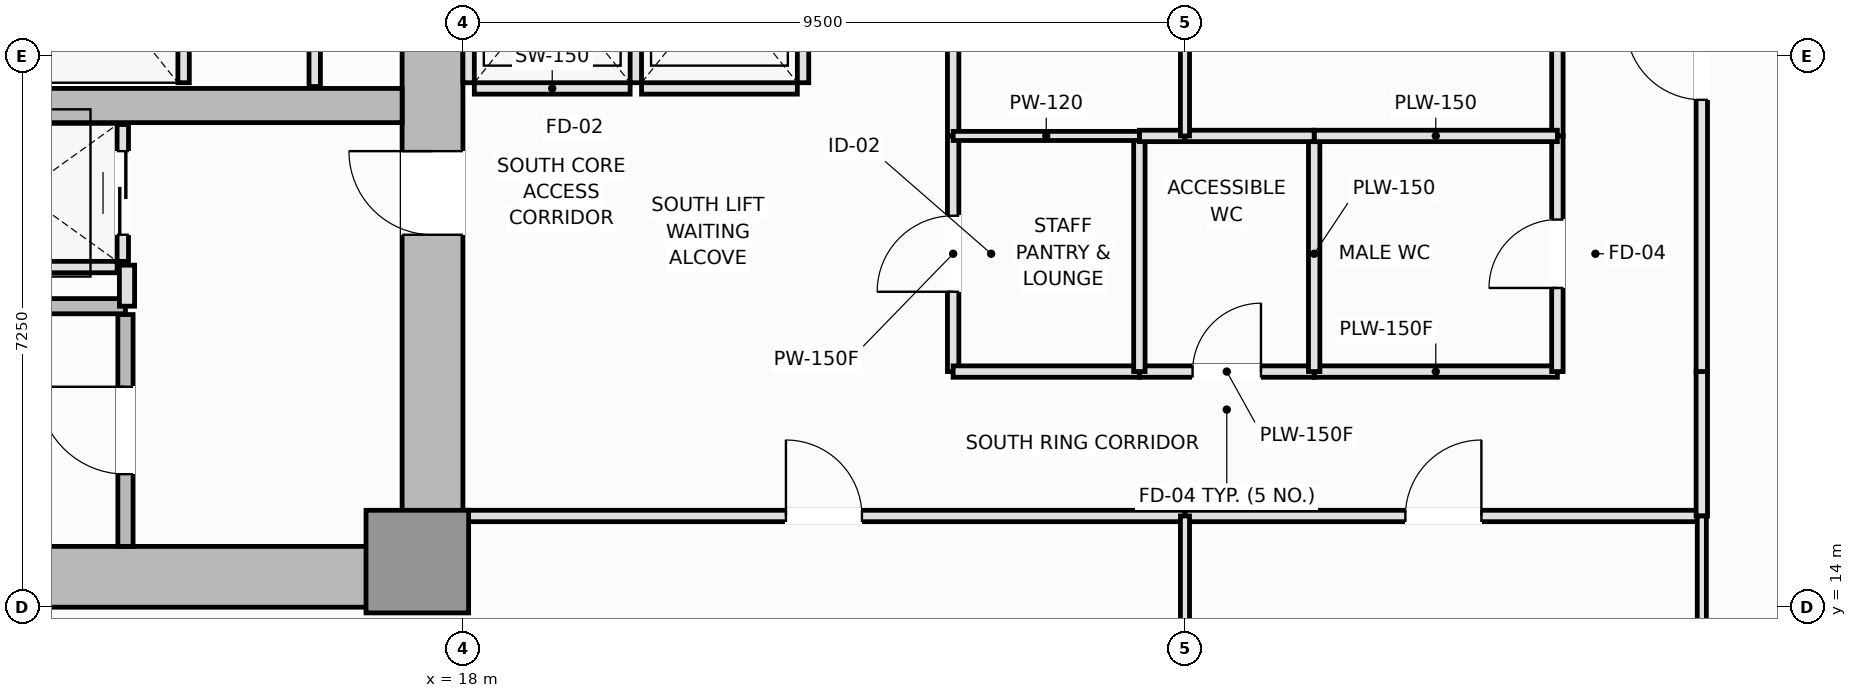
"""IFC4 building model, lengths in metres.
Left out: names, types, materials, properties, quantities, classifications, styles, units other than length and angle.
Written with IfcOpenShell. Run it as: python <this file> out.ifc"""

import sys

from ifc_helpers import new_model, si_unit, direction, frame, frame_2d, origin, origin_2d, place, context, subcontext, project, spatial, rectangle, extrude, element, fill, save


model = new_model("IFC4")
c1 = context("Model", 3, precision=1e-05, world=origin(), true_north=direction((0.0, 1.0)))
c2 = subcontext(c1, "Body", "Model", "MODEL_VIEW")
j1 = project(units=[si_unit("LENGTHUNIT", "METRE"), si_unit("PLANEANGLEUNIT", "RADIAN")], contexts=[c1])
p1 = place(None, origin())
s1 = spatial("IfcSite", under=j1, at=p1, CompositionType="ELEMENT")
p2 = place(p1, origin())
s2 = spatial("IfcBuilding", under=s1, at=p2, CompositionType="ELEMENT")
p3 = place(p2, frame((0.0, 0.0, 36.25)))
s3 = spatial("IfcBuildingStorey", under=s2, at=p3, CompositionType="ELEMENT", Elevation=36.25)
p4 = place(p3, frame((4.5, 14.4, 0.0), z_axis=(0.0, 0.0, 1.0), x_axis=(1.0, 0.0, 0.0)))
e1 = element("IfcWall", 1, at=p4, inside=s3, PredefinedType="SHEAR", context=c2, shape_type="SweptSolid", body=[
    extrude(rectangle(XDim=13.5, YDim=0.8, at=frame_2d((6.75, 0.0))), origin(), (0.0, 0.0, 1.0), 3.55),
])
p5 = place(p3, frame((17.6, 14.8, 0.0), z_axis=(0.0, 0.0, 1.0), x_axis=(0.0, 1.0, 0.0)))
e2 = element("IfcWall", 2, at=p5, inside=s3, PredefinedType="SHEAR", context=c2, shape_type="SweptSolid", body=[
    extrude(rectangle(XDim=8.65, YDim=0.8, at=frame_2d((4.325, 0.0))), origin(), (0.0, 0.0, 1.0), 3.55),
])
p6 = place(p5, frame((4.1, 0.0, 0.0)))
e3 = element("IfcOpeningElement", 3, at=p6, cuts=e2, PredefinedType="OPENING", context=c2, shape_type="SweptSolid", body=[
    extrude(rectangle(XDim=1.1, YDim=2.15, at=frame_2d((0.55, 1.075))), frame((0.0, 0.41, 0.0), z_axis=(0.0, -1.0, 0.0), x_axis=(1.0, 0.0, 0.0)), (0.0, 0.0, 1.0), 0.82),
])
p7 = place(p3, frame((5.3, 20.6, 0.0), z_axis=(0.0, 0.0, 1.0), x_axis=(1.0, 0.0, 0.0)))
e4 = element("IfcWall", 4, at=p7, inside=s3, PredefinedType="SHEAR", context=c2, shape_type="SweptSolid", body=[
    extrude(rectangle(XDim=11.9, YDim=0.45, at=frame_2d((5.95, 0.0))), origin(), (0.0, 0.0, 1.0), 3.55),
])
p8 = place(p3, frame((17.4, 14.6, 0.0), z_axis=(0.0, 0.0, 1.0), x_axis=(1.0, 0.0, 0.0)))
e5 = element("IfcColumn", 5, at=p8, inside=s3, PredefinedType="PILASTER", context=c2, shape_type="SweptSolid", body=[
    extrude(rectangle(XDim=1.35, YDim=1.35, at=origin_2d()), origin(), (0.0, 0.0, 1.0), 3.55),
])
p9 = place(p3, frame((5.9, 17.96, 0.0), z_axis=(0.0, 0.0, 1.0), x_axis=(1.0, 0.0, 0.0)))
e6 = element("IfcWall", 6, at=p9, inside=s3, PredefinedType="SOLIDWALL", context=c2, shape_type="SweptSolid", body=[
    extrude(rectangle(XDim=7.66, YDim=0.2, at=frame_2d((3.83, 0.0))), origin(), (0.0, 0.0, 1.0), 3.55),
])
p10 = place(p3, frame((13.56, 14.8, 0.0), z_axis=(0.0, 0.0, 1.0), x_axis=(0.0, 1.0, 0.0)))
e7 = element("IfcWall", 7, at=p10, inside=s3, PredefinedType="SOLIDWALL", context=c2, shape_type="SweptSolid", body=[
    extrude(rectangle(XDim=3.05, YDim=0.2, at=frame_2d((1.525, 0.0))), origin(), (0.0, 0.0, 1.0), 3.55),
])
p11 = place(p10, frame((0.95, 0.0, 0.0)))
e8 = element("IfcOpeningElement", 8, at=p11, cuts=e7, PredefinedType="OPENING", context=c2, shape_type="SweptSolid", body=[
    extrude(rectangle(XDim=1.15, YDim=2.15, at=frame_2d((0.575, 1.075))), frame((0.0, 0.11, 0.0), z_axis=(0.0, -1.0, 0.0), x_axis=(1.0, 0.0, 0.0)), (0.0, 0.0, 1.0), 0.22),
])
p12 = place(p3, frame((18.15, 20.825, 0.0), z_axis=(0.0, 0.0, 1.0), x_axis=(1.0, 0.0, 0.0)))
e9 = element("IfcWall", 9, at=p12, inside=s3, PredefinedType="PARTITIONING", context=c2, shape_type="SweptSolid", body=[
    extrude(rectangle(XDim=2.05, YDim=0.15, at=frame_2d((1.025, 0.0))), origin(), (0.0, 0.0, 1.0), 3.37),
])
for number, where, z_axis, x_axis in (
    (10, (18.075, 20.9, 0.0), (0.0, 0.0, 1.0), (0.0, 1.0, 0.0)),
    (11, (20.275, 20.9, 0.0), (0.0, 0.0, 1.0), (0.0, 1.0, 0.0)),
):
    element("IfcWall", number, at=place(p3, frame(where, z_axis=z_axis, x_axis=x_axis)), inside=s3, PredefinedType="PARTITIONING", context=c2, shape_type="SweptSolid", body=[
        extrude(rectangle(XDim=2.55, YDim=0.15, at=frame_2d((1.275, 0.0))), origin(), (0.0, 0.0, 1.0), 3.37),
    ])
p13 = place(p3, frame((20.35, 20.825, 0.0), z_axis=(0.0, 0.0, 1.0), x_axis=(1.0, 0.0, 0.0)))
e12 = element("IfcWall", 12, at=p13, inside=s3, PredefinedType="PARTITIONING", context=c2, shape_type="SweptSolid", body=[
    extrude(rectangle(XDim=2.05, YDim=0.15, at=frame_2d((1.025, 0.0))), origin(), (0.0, 0.0, 1.0), 3.37),
])
for number, where, z_axis, x_axis in (
    (13, (22.475, 20.9, 0.0), (0.0, 0.0, 1.0), (0.0, 1.0, 0.0)),
    (14, (14.325, 20.9, 0.0), (0.0, 0.0, 1.0), (0.0, 1.0, 0.0)),
):
    element("IfcWall", number, at=place(p3, frame(where, z_axis=z_axis, x_axis=x_axis)), inside=s3, PredefinedType="PARTITIONING", context=c2, shape_type="SweptSolid", body=[
        extrude(rectangle(XDim=2.55, YDim=0.15, at=frame_2d((1.275, 0.0))), origin(), (0.0, 0.0, 1.0), 3.37),
    ])
p14 = place(p3, frame((10.95, 18.475, 0.0), z_axis=(0.0, 0.0, 1.0), x_axis=(1.0, 0.0, 0.0)))
e15 = element("IfcWall", 15, at=p14, inside=s3, PredefinedType="PARTITIONING", context=c2, shape_type="SweptSolid", body=[
    extrude(rectangle(XDim=2.5, YDim=0.15, at=frame_2d((1.25, 0.0))), origin(), (0.0, 0.0, 1.0), 3.37),
])
p15 = place(p3, frame((13.525, 18.55, 0.0), z_axis=(0.0, 0.0, 1.0), x_axis=(0.0, 1.0, 0.0)))
e16 = element("IfcWall", 16, at=p15, inside=s3, PredefinedType="PARTITIONING", context=c2, shape_type="SweptSolid", body=[
    extrude(rectangle(XDim=1.8, YDim=0.15, at=frame_2d((0.9, 0.0))), origin(), (0.0, 0.0, 1.0), 3.37),
])
p16 = place(p15, frame((0.35, 0.0, 0.0)))
e17 = element("IfcOpeningElement", 17, at=p16, cuts=e16, PredefinedType="OPENING", context=c2, shape_type="SweptSolid", body=[
    extrude(rectangle(XDim=1.1, YDim=2.2, at=frame_2d((0.55, 1.1))), frame((0.0, 0.085, 0.0), z_axis=(0.0, -1.0, 0.0), x_axis=(1.0, 0.0, 0.0)), (0.0, 0.0, 1.0), 0.17),
])
p17 = place(p3, frame((13.58, 17.96, 0.0), z_axis=(0.0, 0.0, 1.0), x_axis=(0.0, 1.0, 0.0)))
e18 = element("IfcWall", 18, at=p17, inside=s3, PredefinedType="PARTITIONING", context=c2, shape_type="SweptSolid", body=[
    extrude(rectangle(XDim=0.54, YDim=0.2, at=frame_2d((0.27, 0.0))), origin(), (0.0, 0.0, 1.0), 3.37),
])
p18 = place(p3, frame((16.05, 20.85, 0.0), z_axis=(0.0, 0.0, 1.0), x_axis=(0.0, 1.0, 0.0)))
e19 = element("IfcWall", 19, at=p18, inside=s3, PredefinedType="PARTITIONING", context=c2, shape_type="SweptSolid", body=[
    extrude(rectangle(XDim=2.67, YDim=0.15, at=frame_2d((1.335, 0.0))), origin(), (0.0, 0.0, 1.0), 3.37),
])
p19 = place(p18, frame((0.885, 0.0, 0.0)))
e20 = element("IfcOpeningElement", 20, at=p19, cuts=e19, PredefinedType="OPENING", context=c2, shape_type="SweptSolid", body=[
    extrude(rectangle(XDim=0.9, YDim=2.1, at=frame_2d((0.45, 1.05))), frame((0.0, 0.085, 0.0), z_axis=(0.0, -1.0, 0.0), x_axis=(1.0, 0.0, 0.0)), (0.0, 0.0, 1.0), 0.17),
])
p20 = place(p3, frame((24.45, 17.1, 0.0), z_axis=(0.0, 0.0, 1.0), x_axis=(0.0, 1.0, 0.0)))
e21 = element("IfcWall", 21, at=p20, inside=s3, PredefinedType="PARTITIONING", context=c2, shape_type="SweptSolid", body=[
    extrude(rectangle(XDim=3.1, YDim=0.15, at=frame_2d((1.55, 0.0))), origin(), (0.0, 0.0, 1.0), 3.37),
])
p21 = place(p20, frame((1.05, 0.0, 0.0)))
e22 = element("IfcOpeningElement", 22, at=p21, cuts=e21, PredefinedType="OPENING", context=c2, shape_type="SweptSolid", body=[
    extrude(rectangle(XDim=1.0, YDim=2.15, at=frame_2d((0.5, 1.075))), frame((0.0, 0.085, 0.0), z_axis=(0.0, -1.0, 0.0), x_axis=(1.0, 0.0, 0.0)), (0.0, 0.0, 1.0), 0.17),
])
p22 = place(p3, frame((24.45, 20.2, 0.0), z_axis=(0.0, 0.0, 1.0), x_axis=(0.0, 1.0, 0.0)))
e23 = element("IfcWall", 23, at=p22, inside=s3, PredefinedType="PARTITIONING", context=c2, shape_type="SweptSolid", body=[
    extrude(rectangle(XDim=5.05, YDim=0.15, at=frame_2d((2.525, 0.0))), origin(), (0.0, 0.0, 1.0), 3.37),
])
p23 = place(p22, frame((2.025, 0.0, 0.0)))
e24 = element("IfcOpeningElement", 24, at=p23, cuts=e23, PredefinedType="OPENING", context=c2, shape_type="SweptSolid", body=[
    extrude(rectangle(XDim=1.0, YDim=2.15, at=frame_2d((0.5, 1.075))), frame((0.0, 0.085, 0.0), z_axis=(0.0, -1.0, 0.0), x_axis=(1.0, 0.0, 0.0)), (0.0, 0.0, 1.0), 0.17),
])
p24 = place(p3, frame((29.2, 17.1, 0.0), z_axis=(0.0, 0.0, 1.0), x_axis=(1.0, 0.0, 0.0)))
e25 = element("IfcWall", 25, at=p24, inside=s3, PredefinedType="PLUMBINGWALL", context=c2, shape_type="SweptSolid", body=[
    extrude(rectangle(XDim=3.2, YDim=0.15, at=frame_2d((1.6, 0.0))), origin(), (0.0, 0.0, 1.0), 3.37),
])
p25 = place(p3, frame((26.9, 17.1, 0.0), z_axis=(0.0, 0.0, 1.0), x_axis=(1.0, 0.0, 0.0)))
e26 = element("IfcWall", 26, at=p25, inside=s3, PredefinedType="PLUMBINGWALL", context=c2, shape_type="SweptSolid", body=[
    extrude(rectangle(XDim=2.3, YDim=0.15, at=frame_2d((1.15, 0.0))), origin(), (0.0, 0.0, 1.0), 3.37),
])
p26 = place(p25, frame((0.7, 0.0, 0.0)))
e27 = element("IfcOpeningElement", 27, at=p26, cuts=e26, PredefinedType="OPENING", context=c2, shape_type="SweptSolid", body=[
    extrude(rectangle(XDim=0.9, YDim=2.1, at=frame_2d((0.45, 1.05))), frame((0.0, 0.085, 0.0), z_axis=(0.0, -1.0, 0.0), x_axis=(1.0, 0.0, 0.0)), (0.0, 0.0, 1.0), 0.17),
])
p27 = place(p3, frame((24.45, 17.1, 0.0), z_axis=(0.0, 0.0, 1.0), x_axis=(1.0, 0.0, 0.0)))
e28 = element("IfcWall", 28, at=p27, inside=s3, PredefinedType="PARTITIONING", context=c2, shape_type="SweptSolid", body=[
    extrude(rectangle(XDim=2.45, YDim=0.15, at=frame_2d((1.225, 0.0))), origin(), (0.0, 0.0, 1.0), 3.37),
])
p28 = place(p3, frame((18.0, 15.2, 0.0), z_axis=(0.0, 0.0, 1.0), x_axis=(1.0, 0.0, 0.0)))
e29 = element("IfcWall", 29, at=p28, inside=s3, PredefinedType="PARTITIONING", context=c2, shape_type="SweptSolid", body=[
    extrude(rectangle(XDim=9.5, YDim=0.15, at=frame_2d((4.75, 0.0))), origin(), (0.0, 0.0, 1.0), 3.37),
])
p29 = place(p28, frame((4.25, 0.0, 0.0)))
e30 = element("IfcOpeningElement", 30, at=p29, cuts=e29, PredefinedType="OPENING", context=c2, shape_type="SweptSolid", body=[
    extrude(rectangle(XDim=1.0, YDim=2.15, at=frame_2d((0.5, 1.075))), frame((0.0, 0.085, 0.0), z_axis=(0.0, -1.0, 0.0), x_axis=(1.0, 0.0, 0.0)), (0.0, 0.0, 1.0), 0.17),
])
p30 = place(p3, frame((27.5, 15.2, 0.0), z_axis=(0.0, 0.0, 1.0), x_axis=(1.0, 0.0, 0.0)))
e31 = element("IfcWall", 31, at=p30, inside=s3, PredefinedType="PARTITIONING", context=c2, shape_type="SweptSolid", body=[
    extrude(rectangle(XDim=6.8, YDim=0.15, at=frame_2d((3.4, 0.0))), origin(), (0.0, 0.0, 1.0), 3.37),
])
p31 = place(p30, frame((2.9, 0.0, 0.0)))
e32 = element("IfcOpeningElement", 32, at=p31, cuts=e31, PredefinedType="OPENING", context=c2, shape_type="SweptSolid", body=[
    extrude(rectangle(XDim=1.0, YDim=2.15, at=frame_2d((0.5, 1.075))), frame((0.0, 0.085, 0.0), z_axis=(0.0, -1.0, 0.0), x_axis=(1.0, 0.0, 0.0)), (0.0, 0.0, 1.0), 0.17),
])
p32 = place(p3, frame((34.3, 15.2, 0.0), z_axis=(0.0, 0.0, 1.0), x_axis=(0.0, 1.0, 0.0)))
e33 = element("IfcWall", 33, at=p32, inside=s3, PredefinedType="PARTITIONING", context=c2, shape_type="SweptSolid", body=[
    extrude(rectangle(XDim=1.9, YDim=0.15, at=frame_2d((0.95, 0.0))), origin(), (0.0, 0.0, 1.0), 3.37),
])
p33 = place(p3, frame((32.4, 17.1, 0.0), z_axis=(0.0, 0.0, 1.0), x_axis=(0.0, 1.0, 0.0)))
e34 = element("IfcWall", 34, at=p33, inside=s3, PredefinedType="PLUMBINGWALL", context=c2, shape_type="SweptSolid", body=[
    extrude(rectangle(XDim=3.1, YDim=0.15, at=frame_2d((1.55, 0.0))), origin(), (0.0, 0.0, 1.0), 3.37),
])
p34 = place(p33, frame((1.1, 0.0, 0.0)))
e35 = element("IfcOpeningElement", 35, at=p34, cuts=e34, PredefinedType="OPENING", context=c2, shape_type="SweptSolid", body=[
    extrude(rectangle(XDim=0.9, YDim=2.1, at=frame_2d((0.45, 1.05))), frame((0.0, 0.085, 0.0), z_axis=(0.0, -1.0, 0.0), x_axis=(1.0, 0.0, 0.0)), (0.0, 0.0, 1.0), 0.17),
])
p35 = place(p3, frame((32.4, 20.2, 0.0), z_axis=(0.0, 0.0, 1.0), x_axis=(0.0, 1.0, 0.0)))
e36 = element("IfcWall", 36, at=p35, inside=s3, PredefinedType="PARTITIONING", context=c2, shape_type="SweptSolid", body=[
    extrude(rectangle(XDim=10.1, YDim=0.15, at=frame_2d((5.05, 0.0))), origin(), (0.0, 0.0, 1.0), 3.37),
])
p36 = place(p35, frame((4.55, 0.0, 0.0)))
e37 = element("IfcOpeningElement", 37, at=p36, cuts=e36, PredefinedType="OPENING", context=c2, shape_type="SweptSolid", body=[
    extrude(rectangle(XDim=1.0, YDim=2.15, at=frame_2d((0.5, 1.075))), frame((0.0, 0.085, 0.0), z_axis=(0.0, -1.0, 0.0), x_axis=(1.0, 0.0, 0.0)), (0.0, 0.0, 1.0), 0.17),
])
p37 = place(p3, frame((34.3, 17.1, 0.0), z_axis=(0.0, 0.0, 1.0), x_axis=(0.0, 1.0, 0.0)))
e38 = element("IfcWall", 38, at=p37, inside=s3, PredefinedType="PARTITIONING", context=c2, shape_type="SweptSolid", body=[
    extrude(rectangle(XDim=8.15, YDim=0.15, at=frame_2d((4.075, 0.0))), origin(), (0.0, 0.0, 1.0), 3.37),
])
p38 = place(p37, frame((3.575, 0.0, 0.0)))
e39 = element("IfcOpeningElement", 39, at=p38, cuts=e38, PredefinedType="OPENING", context=c2, shape_type="SweptSolid", body=[
    extrude(rectangle(XDim=1.0, YDim=2.15, at=frame_2d((0.5, 1.075))), frame((0.0, 0.085, 0.0), z_axis=(0.0, -1.0, 0.0), x_axis=(1.0, 0.0, 0.0)), (0.0, 0.0, 1.0), 0.17),
])
p39 = place(p3, frame((29.2, 17.1, 0.0), z_axis=(0.0, 0.0, 1.0), x_axis=(0.0, 1.0, 0.0)))
e40 = element("IfcWall", 40, at=p39, inside=s3, PredefinedType="PLUMBINGWALL", context=c2, shape_type="SweptSolid", body=[
    extrude(rectangle(XDim=3.1, YDim=0.15, at=frame_2d((1.55, 0.0))), origin(), (0.0, 0.0, 1.0), 3.37),
])
p40 = place(p3, frame((29.2, 20.2, 0.0), z_axis=(0.0, 0.0, 1.0), x_axis=(1.0, 0.0, 0.0)))
e41 = element("IfcWall", 41, at=p40, inside=s3, PredefinedType="PLUMBINGWALL", context=c2, shape_type="SweptSolid", body=[
    extrude(rectangle(XDim=3.2, YDim=0.15, at=frame_2d((1.6, 0.0))), origin(), (0.0, 0.0, 1.0), 3.37),
])
p41 = place(p3, frame((26.9, 17.1, 0.0), z_axis=(0.0, 0.0, 1.0), x_axis=(0.0, 1.0, 0.0)))
e42 = element("IfcWall", 42, at=p41, inside=s3, PredefinedType="PLUMBINGWALL", context=c2, shape_type="SweptSolid", body=[
    extrude(rectangle(XDim=3.1, YDim=0.15, at=frame_2d((1.55, 0.0))), origin(), (0.0, 0.0, 1.0), 3.37),
])
p42 = place(p3, frame((26.9, 20.2, 0.0), z_axis=(0.0, 0.0, 1.0), x_axis=(1.0, 0.0, 0.0)))
e43 = element("IfcWall", 43, at=p42, inside=s3, PredefinedType="PLUMBINGWALL", context=c2, shape_type="SweptSolid", body=[
    extrude(rectangle(XDim=0.6, YDim=0.15, at=frame_2d((0.3, 0.0))), origin(), (0.0, 0.0, 1.0), 3.37),
])
p43 = place(p3, frame((27.5, 20.2, 0.0), z_axis=(0.0, 0.0, 1.0), x_axis=(1.0, 0.0, 0.0)))
e44 = element("IfcWall", 44, at=p43, inside=s3, PredefinedType="PLUMBINGWALL", context=c2, shape_type="SweptSolid", body=[
    extrude(rectangle(XDim=1.7, YDim=0.15, at=frame_2d((0.85, 0.0))), origin(), (0.0, 0.0, 1.0), 3.37),
])
p44 = place(p3, frame((24.45, 20.2, 0.0), z_axis=(0.0, 0.0, 1.0), x_axis=(1.0, 0.0, 0.0)))
e45 = element("IfcWall", 45, at=p44, inside=s3, PredefinedType="PARTITIONING", context=c2, shape_type="SweptSolid", body=[
    extrude(rectangle(XDim=2.45, YDim=0.12, at=frame_2d((1.225, 0.0))), origin(), (0.0, 0.0, 1.0), 3.37),
])
p45 = place(p3, frame((27.5, 20.2, 0.0), z_axis=(0.0, 0.0, 1.0), x_axis=(0.0, 1.0, 0.0)))
e46 = element("IfcWall", 46, at=p45, inside=s3, PredefinedType="PARTITIONING", context=c2, shape_type="SweptSolid", body=[
    extrude(rectangle(XDim=5.05, YDim=0.12, at=frame_2d((2.525, 0.0))), origin(), (0.0, 0.0, 1.0), 3.37),
])
p46 = place(p3, frame((27.5, 2.51, 0.0), z_axis=(0.0, 0.0, 1.0), x_axis=(0.0, 1.0, 0.0)))
e47 = element("IfcWall", 47, at=p46, inside=s3, PredefinedType="PARTITIONING", context=c2, shape_type="SweptSolid", body=[
    extrude(rectangle(XDim=12.69, YDim=0.12, at=frame_2d((6.345, 0.0))), origin(), (0.0, 0.0, 1.0), 2.82),
])
p47 = place(p3, frame((34.3, 2.51, 0.0), z_axis=(0.0, 0.0, 1.0), x_axis=(0.0, 1.0, 0.0)))
e48 = element("IfcWall", 48, at=p47, inside=s3, PredefinedType="PARTITIONING", context=c2, shape_type="SweptSolid", body=[
    extrude(rectangle(XDim=12.69, YDim=0.12, at=frame_2d((6.345, 0.0))), origin(), (0.0, 0.0, 1.0), 3.37),
])
p48 = place(p11, origin())
e49 = element("IfcDoor", 49, at=p48, inside=s3, OperationType="SINGLE_SWING_RIGHT", PredefinedType="DOOR", context=c2, shape_type="SweptSolid", body=[
    extrude(rectangle(XDim=1.15, YDim=2.15, at=frame_2d((0.575, 1.075))), frame((0.0, 0.025, 0.0), z_axis=(0.0, -1.0, 0.0), x_axis=(1.0, 0.0, 0.0)), (0.0, 0.0, 1.0), 0.05),
])
fill(e8, e49)
p49 = place(p16, origin())
e50 = element("IfcDoor", 50, at=p49, inside=s3, OperationType="DOUBLE_DOOR_SLIDING", PredefinedType="DOOR", context=c2, shape_type="SweptSolid", body=[
    extrude(rectangle(XDim=1.1, YDim=2.2, at=frame_2d((0.55, 1.1))), frame((0.0, 0.025, 0.0), z_axis=(0.0, -1.0, 0.0), x_axis=(1.0, 0.0, 0.0)), (0.0, 0.0, 1.0), 0.05),
])
fill(e17, e50)
p50 = place(p6, origin())
e51 = element("IfcDoor", 51, at=p50, inside=s3, OperationType="SINGLE_SWING_RIGHT", PredefinedType="DOOR", context=c2, shape_type="SweptSolid", body=[
    extrude(rectangle(XDim=1.1, YDim=2.15, at=frame_2d((0.55, 1.075))), frame((0.0, 0.025, 0.0), z_axis=(0.0, -1.0, 0.0), x_axis=(1.0, 0.0, 0.0)), (0.0, 0.0, 1.0), 0.05),
])
fill(e3, e51)
p51 = place(p21, origin())
e52 = element("IfcDoor", 52, at=p51, inside=s3, OperationType="SINGLE_SWING_LEFT", PredefinedType="DOOR", context=c2, shape_type="SweptSolid", body=[
    extrude(rectangle(XDim=1.0, YDim=2.15, at=frame_2d((0.5, 1.075))), frame((0.0, 0.025, 0.0), z_axis=(0.0, -1.0, 0.0), x_axis=(1.0, 0.0, 0.0)), (0.0, 0.0, 1.0), 0.05),
])
fill(e22, e52)
p52 = place(p26, origin())
e53 = element("IfcDoor", 53, at=p52, inside=s3, OperationType="SINGLE_SWING_RIGHT", PredefinedType="DOOR", context=c2, shape_type="SweptSolid", body=[
    extrude(rectangle(XDim=0.9, YDim=2.1, at=frame_2d((0.45, 1.05))), frame((0.0, 0.025, 0.0), z_axis=(0.0, -1.0, 0.0), x_axis=(1.0, 0.0, 0.0)), (0.0, 0.0, 1.0), 0.05),
])
fill(e27, e53)
p53 = place(p29, origin())
e54 = element("IfcDoor", 54, at=p53, inside=s3, OperationType="SINGLE_SWING_LEFT", PredefinedType="DOOR", context=c2, shape_type="SweptSolid", body=[
    extrude(rectangle(XDim=1.0, YDim=2.15, at=frame_2d((0.5, 1.075))), frame((0.0, 0.025, 0.0), z_axis=(0.0, -1.0, 0.0), x_axis=(1.0, 0.0, 0.0)), (0.0, 0.0, 1.0), 0.05),
])
fill(e30, e54)
p54 = place(p31, origin())
e55 = element("IfcDoor", 55, at=p54, inside=s3, OperationType="SINGLE_SWING_RIGHT", PredefinedType="DOOR", context=c2, shape_type="SweptSolid", body=[
    extrude(rectangle(XDim=1.0, YDim=2.15, at=frame_2d((0.5, 1.075))), frame((0.0, 0.025, 0.0), z_axis=(0.0, -1.0, 0.0), x_axis=(1.0, 0.0, 0.0)), (0.0, 0.0, 1.0), 0.05),
])
fill(e32, e55)
p55 = place(p34, origin())
e56 = element("IfcDoor", 56, at=p55, inside=s3, OperationType="SINGLE_SWING_LEFT", PredefinedType="DOOR", context=c2, shape_type="SweptSolid", body=[
    extrude(rectangle(XDim=0.9, YDim=2.1, at=frame_2d((0.45, 1.05))), frame((0.0, 0.025, 0.0), z_axis=(0.0, -1.0, 0.0), x_axis=(1.0, 0.0, 0.0)), (0.0, 0.0, 1.0), 0.05),
])
fill(e35, e56)
p56 = place(p38, origin())
e57 = element("IfcDoor", 57, at=p56, inside=s3, OperationType="SINGLE_SWING_RIGHT", PredefinedType="DOOR", context=c2, shape_type="SweptSolid", body=[
    extrude(rectangle(XDim=1.0, YDim=2.15, at=frame_2d((0.5, 1.075))), frame((0.0, 0.025, 0.0), z_axis=(0.0, -1.0, 0.0), x_axis=(1.0, 0.0, 0.0)), (0.0, 0.0, 1.0), 0.05),
])
fill(e39, e57)
save(model, sys.argv[1])
